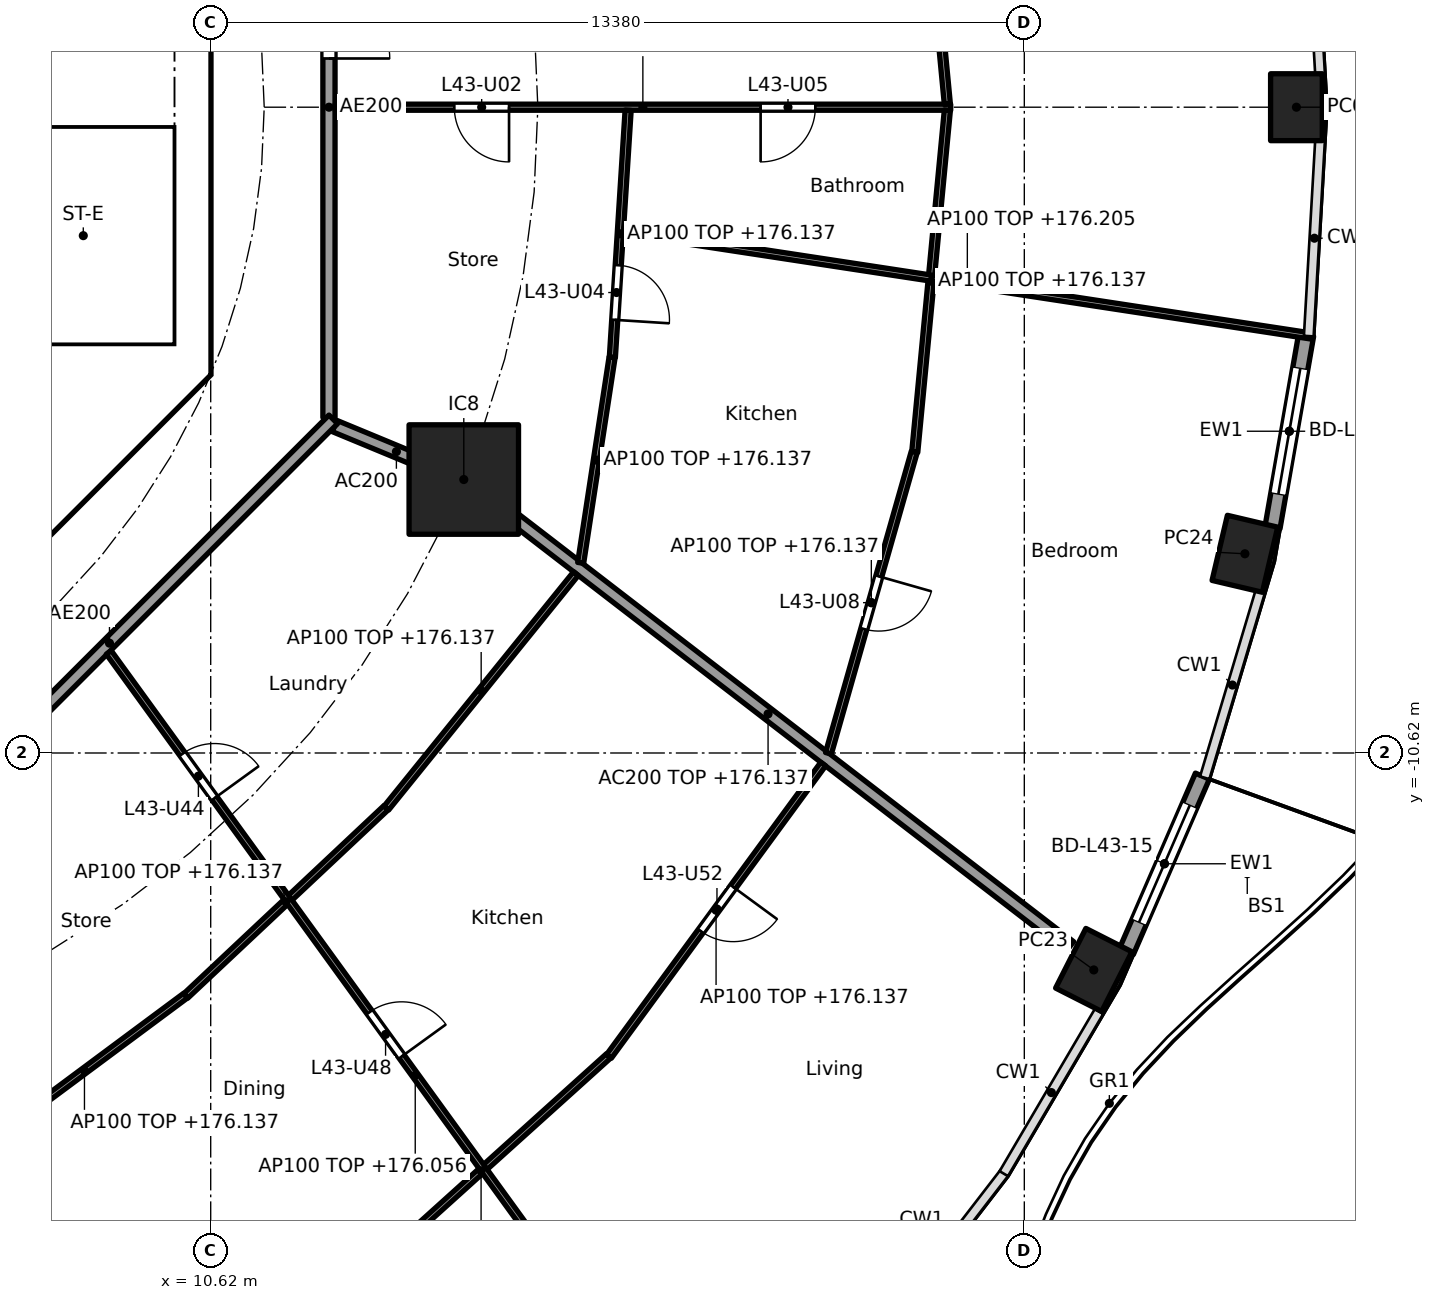
"""IFC4 building model, lengths in metres.
Left out: names, types, materials, properties, quantities, classifications, styles, units other than length and angle.
Written with IfcOpenShell. Run it as: python <this file> out.ifc"""

import sys

from ifc_helpers import new_model, si_unit, direction, frame, frame_2d, origin, origin_2d, place, context, subcontext, project, spatial, polyline, rectangle, hollow_rectangle, outline, extrude, element, fill, save


model = new_model("IFC4")
c1 = context("Model", 3, precision=1e-05, world=origin(), true_north=direction((0.0, 1.0)))
c2 = subcontext(c1, "Body", "Model", "MODEL_VIEW")
j1 = project(units=[si_unit("LENGTHUNIT", "METRE"), si_unit("PLANEANGLEUNIT", "RADIAN")], contexts=[c1])
p1 = place(None, origin())
s1 = spatial("IfcSite", under=j1, at=p1, CompositionType="ELEMENT")
p2 = place(p1, origin())
s2 = spatial("IfcBuilding", under=s1, at=p2, CompositionType="ELEMENT")
p3 = place(p2, frame((0.0, 0.0, 173.3)))
s3 = spatial("IfcBuildingStorey", under=s2, at=p3, CompositionType="ELEMENT", Elevation=173.3)
for number, where, z_axis, x_axis in (
    (1, (28.475, 0.0, 0.0), (0.0, 0.0, 1.0), (0.0, 1.0, 0.0)),
    (2, (25.142, -14.188, 0.0), (0.0, 0.0, 1.0), (0.452, 0.892, 0.0)),
    (3, (27.627, -7.344, 0.0), (0.0, 0.0, 1.0), (0.229, 0.973, 0.0)),
):
    element("IfcColumn", number, at=place(p3, frame(where, z_axis=z_axis, x_axis=x_axis)), inside=s3, PredefinedType="COLUMN", context=c2, shape_type="SweptSolid", body=[
        extrude(hollow_rectangle(XDim=1.1, YDim=0.85, WallThickness=0.036, at=origin_2d()), origin(), (0.0, 0.0, 1.0), 3.7),
    ])
p4 = place(p3, frame((14.782, -6.123, 0.0), z_axis=(0.0, 0.0, 1.0), x_axis=(1.0, 0.0, 0.0)))
e4 = element("IfcColumn", 4, at=p4, inside=s3, PredefinedType="COLUMN", context=c2, shape_type="SweptSolid", body=[
    extrude(rectangle(XDim=1.8, YDim=1.8, at=origin_2d()), origin(), (0.0, 0.0, 1.0), 3.7),
])
p5 = place(p3, frame((26.929, -11.0, 0.0), z_axis=(0.0, 0.0, 1.0), x_axis=(-0.397620521824, -0.917549955384, 0.0)))
e5 = element("IfcWall", 5, at=p5, inside=s3, PredefinedType="SOLIDWALL", context=c2, shape_type="SweptSolid", body=[
    extrude(rectangle(XDim=3.142, YDim=0.25, at=frame_2d((1.571, 0.0))), origin(), (0.0, 0.0, 1.0), 3.44),
])
p6 = place(p5, frame((0.521, 0.0, 0.0)))
e6 = element("IfcOpeningElement", 6, at=p6, cuts=e5, PredefinedType="OPENING", context=c2, shape_type="SweptSolid", body=[
    extrude(rectangle(XDim=2.1, YDim=2.4, at=frame_2d((1.05, 1.2))), frame((0.0, 0.135, 0.0), z_axis=(0.0, -1.0, 0.0), x_axis=(1.0, 0.0, 0.0)), (0.0, 0.0, 1.0), 0.27),
])
p7 = place(p3, frame((28.635, -3.747, 0.0), z_axis=(0.0, 0.0, 1.0), x_axis=(-0.172149769468, -0.985070787747, 0.0)))
e7 = element("IfcWall", 7, at=p7, inside=s3, PredefinedType="SOLIDWALL", context=c2, shape_type="SweptSolid", body=[
    extrude(rectangle(XDim=3.211, YDim=0.25, at=frame_2d((1.605, 0.0))), origin(), (0.0, 0.0, 1.0), 3.44),
])
p8 = place(p7, frame((0.555, 0.0, 0.0)))
e8 = element("IfcOpeningElement", 8, at=p8, cuts=e7, PredefinedType="OPENING", context=c2, shape_type="SweptSolid", body=[
    extrude(rectangle(XDim=2.1, YDim=2.4, at=frame_2d((1.05, 1.2))), frame((0.0, 0.135, 0.0), z_axis=(0.0, -1.0, 0.0), x_axis=(1.0, 0.0, 0.0)), (0.0, 0.0, 1.0), 0.27),
])
p9 = place(p3, frame((4.613, -9.988, 0.0), z_axis=(0.0, 0.0, 1.0), x_axis=(0.707106781187, 0.707106781187, 0.0)))
e9 = element("IfcWall", 9, at=p9, inside=s3, PredefinedType="SHEAR", context=c2, shape_type="SweptSolid", body=[
    extrude(rectangle(XDim=7.602, YDim=0.6, at=frame_2d((3.801, 0.0))), origin(), (0.0, 0.0, 1.0), 3.44),
])
p10 = place(p9, frame((3.201, 0.0, 0.0)))
e10 = element("IfcOpeningElement", 10, at=p10, cuts=e9, PredefinedType="OPENING", context=c2, shape_type="SweptSolid", body=[
    extrude(rectangle(XDim=1.2, YDim=2.1, at=frame_2d((0.6, 1.05))), frame((0.0, 0.31, 0.0), z_axis=(0.0, -1.0, 0.0), x_axis=(1.0, 0.0, 0.0)), (0.0, 0.0, 1.0), 0.62),
])
p11 = place(p3, origin())
e11 = element("IfcWall", 11, at=p11, inside=s3, PredefinedType="SHEAR", context=c2, shape_type="SweptSolid", body=[
    extrude(outline(polyline([(9.776, -4.401), (10.025, -4.152), (10.025, -3.801), (10.025, 4.152), (9.776, 4.401), (10.2, 4.825), (10.625, 4.401), (10.625, -4.401), (10.2, -4.825), (9.776, -4.401)])), origin(), (0.0, 0.0, 1.0), 3.44),
])
p12 = place(p3, origin())
e12 = element("IfcWall", 12, at=p12, inside=s3, PredefinedType="SOLIDWALL", context=c2, shape_type="SweptSolid", body=[
    extrude(outline(polyline([(10.025, -4.1), (6.7, -4.1), (6.7, -3.9), (10.025, -3.9), (10.025, -4.1)])), origin(), (0.0, 0.0, 1.0), 3.44),
])
p13 = place(p3, frame((12.657, -5.243, 0.0), z_axis=(0.0, 0.0, 1.0), x_axis=(0.92383017907, -0.382802560388, 0.0)))
e13 = element("IfcWall", 13, at=p13, inside=s3, PredefinedType="PARTITIONING", context=c2, shape_type="SweptSolid", body=[
    extrude(rectangle(XDim=2.2, YDim=0.2, at=frame_2d((1.1, 0.0))), origin(), (0.0, 0.0, 1.0), 3.44),
])
p14 = place(p3, frame((14.822, -6.154, 0.0), z_axis=(0.0, 0.0, 1.0), x_axis=(0.792203056092, -0.610257583254, 0.0)))
e14 = element("IfcWall", 14, at=p14, inside=s3, PredefinedType="PARTITIONING", context=c2, shape_type="SweptSolid", body=[
    extrude(rectangle(XDim=12.533, YDim=0.2, at=frame_2d((6.266, 0.0))), origin(), (0.0, 0.0, 1.0), 2.837),
])
p15 = place(p3, frame((12.565, -5.104, 0.0), z_axis=(0.0, 0.0, 1.0), x_axis=(0.0, 1.0, 0.0)))
e15 = element("IfcWall", 15, at=p15, inside=s3, PredefinedType="PARTITIONING", context=c2, shape_type="SweptSolid", body=[
    extrude(rectangle(XDim=10.209, YDim=0.2, at=frame_2d((5.104, 0.0))), origin(), (0.0, 0.0, 1.0), 3.44),
])
p16 = place(p15, frame((5.906, 0.0, 0.0)))
e16 = element("IfcOpeningElement", 16, at=p16, cuts=e15, PredefinedType="OPENING", context=c2, shape_type="SweptSolid", body=[
    extrude(rectangle(XDim=1.0, YDim=2.1, at=frame_2d((0.5, 1.05))), frame((0.0, 0.11, 0.0), z_axis=(0.0, -1.0, 0.0), x_axis=(1.0, 0.0, 0.0)), (0.0, 0.0, 1.0), 0.22),
])
p17 = place(p3, frame((5.275, -12.494, 0.0), z_axis=(0.0, 0.0, 1.0), x_axis=(0.707106781187, 0.707106781187, 0.0)))
e17 = element("IfcWall", 17, at=p17, inside=s3, PredefinedType="PARTITIONING", context=c2, shape_type="SweptSolid", body=[
    extrude(rectangle(XDim=10.409, YDim=0.2, at=frame_2d((5.205, 0.0))), origin(), (0.0, 0.0, 1.0), 3.44),
])
p18 = place(p3, frame((12.665, 0.0, 0.0), z_axis=(0.0, 0.0, 1.0), x_axis=(1.0, 0.0, 0.0)))
e18 = element("IfcWall", 18, at=p18, inside=s3, PredefinedType="PARTITIONING", context=c2, shape_type="SweptSolid", body=[
    extrude(rectangle(XDim=10.124, YDim=0.1, at=frame_2d((5.062, 0.0))), origin(), (0.0, 0.0, 1.0), 2.756),
])
p19 = place(p18, frame((1.961, 0.0, 0.0)))
e19 = element("IfcOpeningElement", 19, at=p19, cuts=e18, PredefinedType="OPENING", context=c2, shape_type="SweptSolid", body=[
    extrude(rectangle(XDim=0.9, YDim=2.1, at=frame_2d((0.45, 1.05))), frame((0.0, 0.06, 0.0), z_axis=(0.0, -1.0, 0.0), x_axis=(1.0, 0.0, 0.0)), (0.0, 0.0, 1.0), 0.12),
])
p20 = place(p18, frame((6.999, 0.0, 0.0)))
e20 = element("IfcOpeningElement", 20, at=p20, cuts=e18, PredefinedType="OPENING", context=c2, shape_type="SweptSolid", body=[
    extrude(rectangle(XDim=0.9, YDim=2.1, at=frame_2d((0.45, 1.05))), frame((0.0, 0.06, 0.0), z_axis=(0.0, -1.0, 0.0), x_axis=(1.0, 0.0, 0.0)), (0.0, 0.0, 1.0), 0.12),
])
p21 = place(p3, frame((17.485, -0.05, 0.0), z_axis=(0.0, 0.0, 1.0), x_axis=(-0.063673473968, -0.997970785501, 0.0)))
e21 = element("IfcWall", 21, at=p21, inside=s3, PredefinedType="PARTITIONING", context=c2, shape_type="SweptSolid", body=[
    extrude(rectangle(XDim=4.072, YDim=0.1, at=frame_2d((2.036, 0.0))), origin(), (0.0, 0.0, 1.0), 2.837),
])
p22 = place(p21, frame((2.554, 0.0, 0.0)))
e22 = element("IfcOpeningElement", 22, at=p22, cuts=e21, PredefinedType="OPENING", context=c2, shape_type="SweptSolid", body=[
    extrude(rectangle(XDim=0.9, YDim=2.1, at=frame_2d((0.45, 1.05))), frame((0.0, 0.06, 0.0), z_axis=(0.0, -1.0, 0.0), x_axis=(1.0, 0.0, 0.0)), (0.0, 0.0, 1.0), 0.12),
])
p23 = place(p3, frame((22.734, 0.05, 0.0), z_axis=(0.0, 0.0, 1.0), x_axis=(-0.094923312677, 0.995484587882, 0.0)))
e23 = element("IfcWall", 23, at=p23, inside=s3, PredefinedType="PARTITIONING", context=c2, shape_type="SweptSolid", body=[
    extrude(rectangle(XDim=5.548, YDim=0.1, at=frame_2d((2.774, 0.0))), origin(), (0.0, 0.0, 1.0), 2.837),
])
p24 = place(p23, frame((2.324, 0.0, 0.0)))
e24 = element("IfcOpeningElement", 24, at=p24, cuts=e23, PredefinedType="OPENING", context=c2, shape_type="SweptSolid", body=[
    extrude(rectangle(XDim=0.9, YDim=2.1, at=frame_2d((0.45, 1.05))), frame((0.0, 0.06, 0.0), z_axis=(0.0, -1.0, 0.0), x_axis=(1.0, 0.0, 0.0)), (0.0, 0.0, 1.0), 0.12),
])
p25 = place(p3, frame((22.734, -0.05, 0.0), z_axis=(0.0, 0.0, 1.0), x_axis=(-0.0949274088, -0.995484197292, 0.0)))
e25 = element("IfcWall", 25, at=p25, inside=s3, PredefinedType="PARTITIONING", context=c2, shape_type="SweptSolid", body=[
    extrude(rectangle(XDim=5.648, YDim=0.1, at=frame_2d((2.824, 0.0))), origin(), (0.0, 0.0, 1.0), 2.837),
])
p26 = place(p3, frame((6.138, -14.83, 0.0), z_axis=(0.0, 0.0, 1.0), x_axis=(0.294818517221, -0.955553264818, 0.0)))
e26 = element("IfcWall", 26, at=p26, inside=s3, PredefinedType="PARTITIONING", context=c2, shape_type="SweptSolid", body=[
    extrude(rectangle(XDim=12.619, YDim=0.1, at=frame_2d((6.31, 0.0))), origin(), (0.0, 0.0, 1.0), 2.837),
])
p27 = place(p26, frame((1.306, 0.0, 0.0)))
e27 = element("IfcOpeningElement", 27, at=p27, cuts=e26, PredefinedType="OPENING", context=c2, shape_type="SweptSolid", body=[
    extrude(rectangle(XDim=0.9, YDim=2.1, at=frame_2d((0.45, 1.05))), frame((0.0, 0.06, 0.0), z_axis=(0.0, -1.0, 0.0), x_axis=(1.0, 0.0, 0.0)), (0.0, 0.0, 1.0), 0.12),
])
p28 = place(p26, frame((4.515, 0.0, 0.0)))
e28 = element("IfcOpeningElement", 28, at=p28, cuts=e26, PredefinedType="OPENING", context=c2, shape_type="SweptSolid", body=[
    extrude(rectangle(XDim=0.9, YDim=2.1, at=frame_2d((0.45, 1.05))), frame((0.0, 0.06, 0.0), z_axis=(0.0, -1.0, 0.0), x_axis=(1.0, 0.0, 0.0)), (0.0, 0.0, 1.0), 0.12),
])
p29 = place(p26, frame((9.632, 0.0, 0.0)))
e29 = element("IfcOpeningElement", 29, at=p29, cuts=e26, PredefinedType="OPENING", context=c2, shape_type="SweptSolid", body=[
    extrude(rectangle(XDim=0.9, YDim=2.1, at=frame_2d((0.45, 1.05))), frame((0.0, 0.06, 0.0), z_axis=(0.0, -1.0, 0.0), x_axis=(1.0, 0.0, 0.0)), (0.0, 0.0, 1.0), 0.12),
])
p30 = place(p3, frame((6.881, -17.08, 0.0), z_axis=(0.0, 0.0, 1.0), x_axis=(0.802784956441, 0.596268659005, 0.0)))
e30 = element("IfcWall", 30, at=p30, inside=s3, PredefinedType="PARTITIONING", context=c2, shape_type="SweptSolid", body=[
    extrude(rectangle(XDim=4.142, YDim=0.1, at=frame_2d((2.071, 0.0))), origin(), (0.0, 0.0, 1.0), 2.837),
])
p31 = place(p3, frame((10.21, -14.614, 0.0), z_axis=(0.0, 0.0, 1.0), x_axis=(0.728883199496, 0.684638066055, 0.0)))
e31 = element("IfcWall", 31, at=p31, inside=s3, PredefinedType="PARTITIONING", context=c2, shape_type="SweptSolid", body=[
    extrude(rectangle(XDim=4.519, YDim=0.1, at=frame_2d((2.26, 0.0))), origin(), (0.0, 0.0, 1.0), 2.837),
])
p32 = place(p3, frame((12.971, -19.38, 0.0), z_axis=(0.0, 0.0, 1.0), x_axis=(0.742768881471, 0.669547898748, 0.0)))
e32 = element("IfcWall", 32, at=p32, inside=s3, PredefinedType="PARTITIONING", context=c2, shape_type="SweptSolid", body=[
    extrude(rectangle(XDim=5.642, YDim=0.1, at=frame_2d((2.821, 0.0))), origin(), (0.0, 0.0, 1.0), 2.837),
])
p33 = place(p3, frame((8.943, -8.966, 0.0), z_axis=(0.0, 0.0, 1.0), x_axis=(0.586803608919, -0.809729290912, 0.0)))
e33 = element("IfcWall", 33, at=p33, inside=s3, PredefinedType="PARTITIONING", context=c2, shape_type="SweptSolid", body=[
    extrude(rectangle(XDim=17.179, YDim=0.1, at=frame_2d((8.589, 0.0))), origin(), (0.0, 0.0, 1.0), 2.756),
])
p34 = place(p33, frame((2.062, 0.0, 0.0)))
e34 = element("IfcOpeningElement", 34, at=p34, cuts=e33, PredefinedType="OPENING", context=c2, shape_type="SweptSolid", body=[
    extrude(rectangle(XDim=0.9, YDim=2.1, at=frame_2d((0.45, 1.05))), frame((0.0, 0.06, 0.0), z_axis=(0.0, -1.0, 0.0), x_axis=(1.0, 0.0, 0.0)), (0.0, 0.0, 1.0), 0.12),
])
p35 = place(p33, frame((7.308, 0.0, 0.0)))
e35 = element("IfcOpeningElement", 35, at=p35, cuts=e33, PredefinedType="OPENING", context=c2, shape_type="SweptSolid", body=[
    extrude(rectangle(XDim=0.9, YDim=2.1, at=frame_2d((0.45, 1.05))), frame((0.0, 0.06, 0.0), z_axis=(0.0, -1.0, 0.0), x_axis=(1.0, 0.0, 0.0)), (0.0, 0.0, 1.0), 0.12),
])
p36 = place(p3, frame((13.509, -11.525, 0.0), z_axis=(0.0, 0.0, 1.0), x_axis=(0.628764602857, 0.777595700987, 0.0)))
e36 = element("IfcWall", 36, at=p36, inside=s3, PredefinedType="PARTITIONING", context=c2, shape_type="SweptSolid", body=[
    extrude(rectangle(XDim=4.957, YDim=0.1, at=frame_2d((2.479, 0.0))), origin(), (0.0, 0.0, 1.0), 2.837),
])
p37 = place(p3, frame((17.169, -15.609, 0.0), z_axis=(0.0, 0.0, 1.0), x_axis=(0.591122127251, 0.806582066918, 0.0)))
e37 = element("IfcWall", 37, at=p37, inside=s3, PredefinedType="PARTITIONING", context=c2, shape_type="SweptSolid", body=[
    extrude(rectangle(XDim=5.96, YDim=0.1, at=frame_2d((2.98, 0.0))), origin(), (0.0, 0.0, 1.0), 2.837),
])
p38 = place(p37, frame((2.555, 0.0, 0.0)))
e38 = element("IfcOpeningElement", 38, at=p38, cuts=e37, PredefinedType="OPENING", context=c2, shape_type="SweptSolid", body=[
    extrude(rectangle(XDim=0.9, YDim=2.1, at=frame_2d((0.45, 1.05))), frame((0.0, 0.06, 0.0), z_axis=(0.0, -1.0, 0.0), x_axis=(1.0, 0.0, 0.0)), (0.0, 0.0, 1.0), 0.12),
])
p39 = place(p3, frame((16.704, -7.493, 0.0), z_axis=(0.0, 0.0, 1.0), x_axis=(0.1510806336, 0.988521442434, 0.0)))
e39 = element("IfcWall", 39, at=p39, inside=s3, PredefinedType="PARTITIONING", context=c2, shape_type="SweptSolid", body=[
    extrude(rectangle(XDim=3.419, YDim=0.1, at=frame_2d((1.71, 0.0))), origin(), (0.0, 0.0, 1.0), 2.837),
])
p40 = place(p3, frame((20.779, -10.625, 0.0), z_axis=(0.0, 0.0, 1.0), x_axis=(0.273819702124, 0.961781040949, 0.0)))
e40 = element("IfcWall", 40, at=p40, inside=s3, PredefinedType="PARTITIONING", context=c2, shape_type="SweptSolid", body=[
    extrude(rectangle(XDim=5.152, YDim=0.1, at=frame_2d((2.576, 0.0))), origin(), (0.0, 0.0, 1.0), 2.837),
])
p41 = place(p40, frame((2.126, 0.0, 0.0)))
e41 = element("IfcOpeningElement", 41, at=p41, cuts=e40, PredefinedType="OPENING", context=c2, shape_type="SweptSolid", body=[
    extrude(rectangle(XDim=0.9, YDim=2.1, at=frame_2d((0.45, 1.05))), frame((0.0, 0.06, 0.0), z_axis=(0.0, -1.0, 0.0), x_axis=(1.0, 0.0, 0.0)), (0.0, 0.0, 1.0), 0.12),
])
p42 = place(p3, frame((17.407, -2.039, 0.0), z_axis=(0.0, 0.0, 1.0), x_axis=(0.98858728603, -0.150649188184, 0.0)))
e42 = element("IfcWall", 42, at=p42, inside=s3, PredefinedType="PARTITIONING", context=c2, shape_type="SweptSolid", body=[
    extrude(rectangle(XDim=11.441, YDim=0.1, at=frame_2d((5.721, 0.0))), origin(), (0.0, 0.0, 1.0), 2.905),
])
p43 = place(p6, origin())
e43 = element("IfcDoor", 43, at=p43, inside=s3, OperationType="SLIDING_TO_LEFT", PredefinedType="DOOR", context=c2, shape_type="SweptSolid", body=[
    extrude(rectangle(XDim=2.1, YDim=2.4, at=frame_2d((1.05, 1.2))), frame((0.0, 0.025, 0.0), z_axis=(0.0, -1.0, 0.0), x_axis=(1.0, 0.0, 0.0)), (0.0, 0.0, 1.0), 0.05),
])
fill(e6, e43)
p44 = place(p8, origin())
e44 = element("IfcDoor", 44, at=p44, inside=s3, OperationType="SLIDING_TO_LEFT", PredefinedType="DOOR", context=c2, shape_type="SweptSolid", body=[
    extrude(rectangle(XDim=2.1, YDim=2.4, at=frame_2d((1.05, 1.2))), frame((0.0, 0.025, 0.0), z_axis=(0.0, -1.0, 0.0), x_axis=(1.0, 0.0, 0.0)), (0.0, 0.0, 1.0), 0.05),
])
fill(e8, e44)
p45 = place(p16, frame((1.0, 0.0, 0.0), x_axis=(-1.0, 0.0, 0.0)))
e45 = element("IfcDoor", 45, at=p45, inside=s3, OperationType="SINGLE_SWING_RIGHT", PredefinedType="DOOR", context=c2, shape_type="SweptSolid", body=[
    extrude(rectangle(XDim=1.0, YDim=2.1, at=frame_2d((0.5, 1.05))), frame((0.0, 0.025, 0.0), z_axis=(0.0, -1.0, 0.0), x_axis=(1.0, 0.0, 0.0)), (0.0, 0.0, 1.0), 0.05),
])
fill(e16, e45)
p46 = place(p19, frame((0.9, 0.0, 0.0), x_axis=(-1.0, 0.0, 0.0)))
e46 = element("IfcDoor", 46, at=p46, inside=s3, OperationType="SINGLE_SWING_LEFT", PredefinedType="DOOR", context=c2, shape_type="SweptSolid", body=[
    extrude(rectangle(XDim=0.9, YDim=2.1, at=frame_2d((0.45, 1.05))), frame((0.0, 0.025, 0.0), z_axis=(0.0, -1.0, 0.0), x_axis=(1.0, 0.0, 0.0)), (0.0, 0.0, 1.0), 0.05),
])
fill(e19, e46)
p47 = place(p22, origin())
e47 = element("IfcDoor", 47, at=p47, inside=s3, OperationType="SINGLE_SWING_RIGHT", PredefinedType="DOOR", context=c2, shape_type="SweptSolid", body=[
    extrude(rectangle(XDim=0.9, YDim=2.1, at=frame_2d((0.45, 1.05))), frame((0.0, 0.025, 0.0), z_axis=(0.0, -1.0, 0.0), x_axis=(1.0, 0.0, 0.0)), (0.0, 0.0, 1.0), 0.05),
])
fill(e22, e47)
p48 = place(p20, frame((0.9, 0.0, 0.0), x_axis=(-1.0, 0.0, 0.0)))
e48 = element("IfcDoor", 48, at=p48, inside=s3, OperationType="SINGLE_SWING_RIGHT", PredefinedType="DOOR", context=c2, shape_type="SweptSolid", body=[
    extrude(rectangle(XDim=0.9, YDim=2.1, at=frame_2d((0.45, 1.05))), frame((0.0, 0.025, 0.0), z_axis=(0.0, -1.0, 0.0), x_axis=(1.0, 0.0, 0.0)), (0.0, 0.0, 1.0), 0.05),
])
fill(e20, e48)
p49 = place(p41, frame((0.9, 0.0, 0.0), x_axis=(-1.0, 0.0, 0.0)))
e49 = element("IfcDoor", 49, at=p49, inside=s3, OperationType="SINGLE_SWING_LEFT", PredefinedType="DOOR", context=c2, shape_type="SweptSolid", body=[
    extrude(rectangle(XDim=0.9, YDim=2.1, at=frame_2d((0.45, 1.05))), frame((0.0, 0.025, 0.0), z_axis=(0.0, -1.0, 0.0), x_axis=(1.0, 0.0, 0.0)), (0.0, 0.0, 1.0), 0.05),
])
fill(e41, e49)
p50 = place(p34, origin())
e50 = element("IfcDoor", 50, at=p50, inside=s3, OperationType="SINGLE_SWING_RIGHT", PredefinedType="DOOR", context=c2, shape_type="SweptSolid", body=[
    extrude(rectangle(XDim=0.9, YDim=2.1, at=frame_2d((0.45, 1.05))), frame((0.0, 0.025, 0.0), z_axis=(0.0, -1.0, 0.0), x_axis=(1.0, 0.0, 0.0)), (0.0, 0.0, 1.0), 0.05),
])
fill(e34, e50)
p51 = place(p35, origin())
e51 = element("IfcDoor", 51, at=p51, inside=s3, OperationType="SINGLE_SWING_RIGHT", PredefinedType="DOOR", context=c2, shape_type="SweptSolid", body=[
    extrude(rectangle(XDim=0.9, YDim=2.1, at=frame_2d((0.45, 1.05))), frame((0.0, 0.025, 0.0), z_axis=(0.0, -1.0, 0.0), x_axis=(1.0, 0.0, 0.0)), (0.0, 0.0, 1.0), 0.05),
])
fill(e35, e51)
p52 = place(p38, frame((0.9, 0.0, 0.0), x_axis=(-1.0, 0.0, 0.0)))
e52 = element("IfcDoor", 52, at=p52, inside=s3, OperationType="SINGLE_SWING_LEFT", PredefinedType="DOOR", context=c2, shape_type="SweptSolid", body=[
    extrude(rectangle(XDim=0.9, YDim=2.1, at=frame_2d((0.45, 1.05))), frame((0.0, 0.025, 0.0), z_axis=(0.0, -1.0, 0.0), x_axis=(1.0, 0.0, 0.0)), (0.0, 0.0, 1.0), 0.05),
])
fill(e38, e52)
save(model, sys.argv[1])
